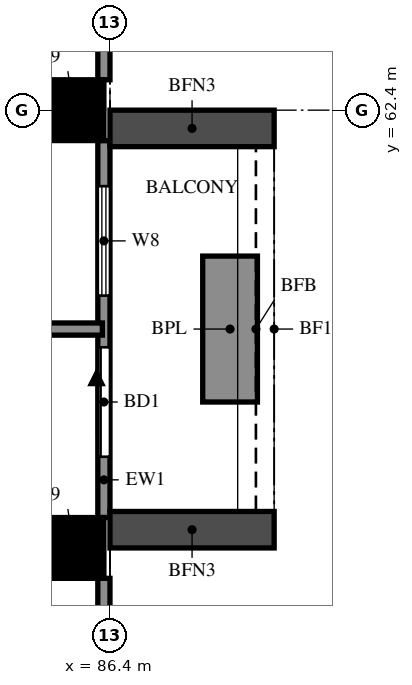
"""IFC4 building model, lengths in metres.
Left out: names, types, materials, properties, quantities, classifications, styles, units other than length and angle.
Written with IfcOpenShell. Run it as: python <this file> out.ifc"""

import sys

from ifc_helpers import new_model, si_unit, direction, frame, frame_2d, origin, origin_2d, place, context, subcontext, project, spatial, rectangle, extrude, source, transform, mapped, element, fill, save


model = new_model("IFC4")
c1 = context("Model", 3, precision=1e-05, world=origin(), true_north=direction((0.0, 1.0)))
c2 = subcontext(c1, "Body", "Model", "MODEL_VIEW")
j1 = project(units=[si_unit("LENGTHUNIT", "METRE"), si_unit("PLANEANGLEUNIT", "RADIAN")], contexts=[c1])
p1 = place(None, origin())
s1 = spatial("IfcSite", under=j1, at=p1, CompositionType="ELEMENT")
p2 = place(p1, origin())
s2 = spatial("IfcBuilding", under=s1, at=p2, CompositionType="ELEMENT")
p3 = place(p2, frame((0.0, 0.0, 86.5)))
s3 = spatial("IfcBuildingStorey", under=s2, at=p3, CompositionType="ELEMENT", Elevation=86.5)
m1 = source(origin(), c2, "Body", "SweptSolid", [
    extrude(rectangle(XDim=1.0, YDim=1.0, at=origin_2d()), origin(), (0.0, 0.0, 1.0), 3.18),
])
for number, where, z_axis, x_axis in (
    (1, (85.8, 55.2, 0.0), (0.0, 0.0, 1.0), (1.0, 0.0, 0.0)),
    (2, (85.8, 62.4, 0.0), (0.0, 0.0, 1.0), (1.0, 0.0, 0.0)),
):
    element("IfcColumn", number, at=place(p3, frame(where, z_axis=z_axis, x_axis=x_axis)), inside=s3, PredefinedType="COLUMN", context=c2, shape_type="MappedRepresentation", body=[
        mapped(m1, transform((0.0, 0.0, 0.0))),
    ])
p4 = place(p3, frame((86.3, 48.5, 0.0), z_axis=(0.0, 0.0, 1.0), x_axis=(0.0, 1.0, 0.0)))
e3 = element("IfcWall", 3, at=p4, inside=s3, PredefinedType="SOLIDWALL", context=c2, shape_type="SweptSolid", body=[
    extrude(rectangle(XDim=6.2, YDim=0.2, at=frame_2d((3.1, 0.0))), origin(), (0.0, 0.0, 1.0), 3.18),
])
p5 = place(p4, frame((1.9, 0.0, 0.6)))
e4 = element("IfcOpeningElement", 4, at=p5, cuts=e3, PredefinedType="OPENING", context=c2, shape_type="SweptSolid", body=[
    extrude(rectangle(XDim=2.4, YDim=2.4, at=frame_2d((1.2, 1.2))), frame((0.0, 0.11, 0.0), z_axis=(0.0, -1.0, 0.0), x_axis=(1.0, 0.0, 0.0)), (0.0, 0.0, 1.0), 0.22),
])
p6 = place(p3, frame((86.3, 55.7, 0.0), z_axis=(0.0, 0.0, 1.0), x_axis=(0.0, 1.0, 0.0)))
e5 = element("IfcWall", 5, at=p6, inside=s3, PredefinedType="SOLIDWALL", context=c2, shape_type="SweptSolid", body=[
    extrude(rectangle(XDim=6.2, YDim=0.2, at=frame_2d((3.1, 0.0))), origin(), (0.0, 0.0, 1.0), 3.18),
])
p7 = place(p6, frame((1.0, 0.0, 0.0)))
e6 = element("IfcOpeningElement", 6, at=p7, cuts=e5, PredefinedType="OPENING", context=c2, shape_type="SweptSolid", body=[
    extrude(rectangle(XDim=1.8, YDim=2.4, at=frame_2d((0.9, 1.2))), frame((0.0, 0.11, 0.0), z_axis=(0.0, -1.0, 0.0), x_axis=(1.0, 0.0, 0.0)), (0.0, 0.0, 1.0), 0.22),
])
p8 = place(p6, frame((3.65, 0.0, 0.6)))
e7 = element("IfcOpeningElement", 7, at=p8, cuts=e5, PredefinedType="OPENING", context=c2, shape_type="SweptSolid", body=[
    extrude(rectangle(XDim=1.8, YDim=2.4, at=frame_2d((0.9, 1.2))), frame((0.0, 0.11, 0.0), z_axis=(0.0, -1.0, 0.0), x_axis=(1.0, 0.0, 0.0)), (0.0, 0.0, 1.0), 0.22),
])
p9 = place(p3, frame((86.3, 62.9, 0.0), z_axis=(0.0, 0.0, 1.0), x_axis=(0.0, 1.0, 0.0)))
e8 = element("IfcWall", 8, at=p9, inside=s3, PredefinedType="SOLIDWALL", context=c2, shape_type="SweptSolid", body=[
    extrude(rectangle(XDim=6.2, YDim=0.2, at=frame_2d((3.1, 0.0))), origin(), (0.0, 0.0, 1.0), 3.18),
])
p10 = place(p9, frame((1.9, 0.0, 0.6)))
e9 = element("IfcOpeningElement", 9, at=p10, cuts=e8, PredefinedType="OPENING", context=c2, shape_type="SweptSolid", body=[
    extrude(rectangle(XDim=2.4, YDim=2.4, at=frame_2d((1.2, 1.2))), frame((0.0, 0.11, 0.0), z_axis=(0.0, -1.0, 0.0), x_axis=(1.0, 0.0, 0.0)), (0.0, 0.0, 1.0), 0.22),
])
for number, where, z_axis, x_axis in (
    (10, (86.4, 55.5, 0.0), (0.0, 0.0, 1.0), (1.0, 0.0, 0.0)),
    (11, (86.4, 62.1, 0.0), (0.0, 0.0, 1.0), (1.0, 0.0, 0.0)),
):
    element("IfcWall", number, at=place(p3, frame(where, z_axis=z_axis, x_axis=x_axis)), inside=s3, PredefinedType="SOLIDWALL", context=c2, shape_type="SweptSolid", body=[
        extrude(rectangle(XDim=2.7, YDim=0.6, at=frame_2d((1.35, 0.0))), origin(), (0.0, 0.0, 1.0), 2.85),
    ])
p11 = place(p3, frame((88.375, 57.6, 0.0), z_axis=(0.0, 0.0, 1.0), x_axis=(0.0, 1.0, 0.0)))
e12 = element("IfcWall", 12, at=p11, inside=s3, PredefinedType="SOLIDWALL", context=c2, shape_type="SweptSolid", body=[
    extrude(rectangle(XDim=2.4, YDim=0.9, at=frame_2d((1.2, 0.0))), origin(), (0.0, 0.0, 1.0), 0.9),
])
p12 = place(p3, frame((74.4, 58.8, 0.0), z_axis=(0.0, 0.0, 1.0), x_axis=(1.0, 0.0, 0.0)))
e13 = element("IfcWall", 13, at=p12, inside=s3, PredefinedType="SOLIDWALL", context=c2, shape_type="SweptSolid", body=[
    extrude(rectangle(XDim=11.875, YDim=0.2, at=frame_2d((5.938, 0.0))), origin(), (0.0, 0.0, 1.0), 2.28),
])
for number, where, z_axis, x_axis in (
    (14, (79.2, 55.2, 0.0), (0.0, 0.0, 1.0), (1.0, 0.0, 0.0)),
    (15, (79.2, 62.4, 0.0), (0.0, 0.0, 1.0), (1.0, 0.0, 0.0)),
):
    element("IfcWall", number, at=place(p3, frame(where, z_axis=z_axis, x_axis=x_axis)), inside=s3, PredefinedType="PARTITIONING", context=c2, shape_type="SweptSolid", body=[
        extrude(rectangle(XDim=7.075, YDim=0.12, at=frame_2d((3.538, 0.0))), origin(), (0.0, 0.0, 1.0), 3.18),
    ])
p13 = place(p7, origin())
e16 = element("IfcDoor", 16, at=p13, inside=s3, OperationType="DOUBLE_DOOR_SLIDING", PredefinedType="DOOR", context=c2, shape_type="SweptSolid", body=[
    extrude(rectangle(XDim=1.8, YDim=2.4, at=frame_2d((0.9, 1.2))), frame((0.0, 0.025, 0.0), z_axis=(0.0, -1.0, 0.0), x_axis=(1.0, 0.0, 0.0)), (0.0, 0.0, 1.0), 0.05),
])
fill(e6, e16)
p14 = place(p8, origin())
e17 = element("IfcWindow", 17, at=p14, inside=s3, PartitioningType="DOUBLE_PANEL_VERTICAL", PredefinedType="WINDOW", context=c2, shape_type="SweptSolid", body=[
    extrude(rectangle(XDim=1.8, YDim=2.4, at=frame_2d((0.9, 1.2))), frame((0.0, 0.03, 0.0), z_axis=(0.0, -1.0, 0.0), x_axis=(1.0, 0.0, 0.0)), (0.0, 0.0, 1.0), 0.06),
])
fill(e7, e17)
save(model, sys.argv[1])
